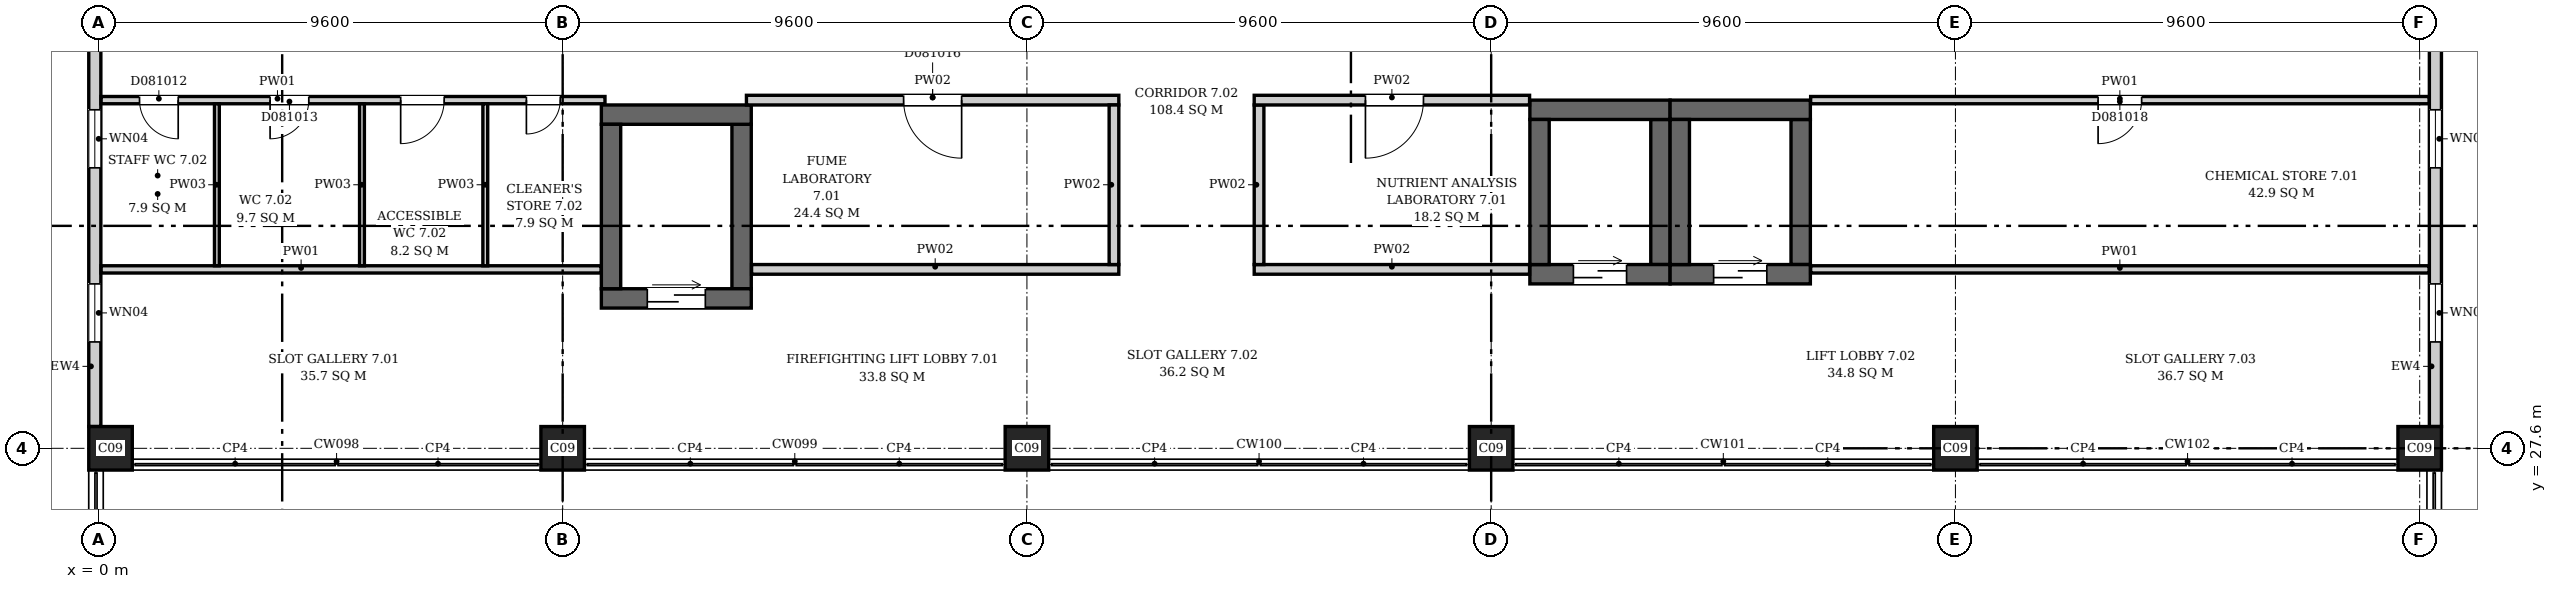
"""IFC4 building model, lengths in metres.
Left out: names, types, materials, properties, quantities, classifications, styles, units other than length and angle.
Written with IfcOpenShell. Run it as: python <this file> out.ifc"""

import sys

from ifc_helpers import new_model, si_unit, direction, frame, frame_2d, origin, origin_2d, place, context, subcontext, project, spatial, rectangle, extrude, element, fill, save


model = new_model("IFC4")
c1 = context("Model", 3, precision=1e-05, world=origin(), true_north=direction((0.0, 1.0)))
c2 = subcontext(c1, "Body", "Model", "MODEL_VIEW")
j1 = project(units=[si_unit("LENGTHUNIT", "METRE"), si_unit("PLANEANGLEUNIT", "RADIAN")], contexts=[c1])
p1 = place(None, origin())
s1 = spatial("IfcSite", under=j1, at=p1, CompositionType="ELEMENT")
p2 = place(p1, origin())
s2 = spatial("IfcBuilding", under=s1, at=p2, CompositionType="ELEMENT")
p3 = place(p2, frame((0.0, 0.0, 40.3)))
s3 = spatial("IfcBuildingStorey", under=s2, at=p3, CompositionType="ELEMENT", Elevation=40.3)
p4 = place(p3, frame((10.4, 30.7, 0.0), z_axis=(0.0, 0.0, 1.0), x_axis=(1.0, 0.0, 0.0)))
e1 = element("IfcWall", 1, at=p4, inside=s3, PredefinedType="SHEAR", context=c2, shape_type="SweptSolid", body=[
    extrude(rectangle(XDim=3.1, YDim=0.4, at=frame_2d((1.55, 0.0))), origin(), (0.0, 0.0, 1.0), 4.2),
])
p5 = place(p4, frame((0.95, 0.0, 0.0)))
e2 = element("IfcOpeningElement", 2, at=p5, cuts=e1, PredefinedType="OPENING", context=c2, shape_type="SweptSolid", body=[
    extrude(rectangle(XDim=1.2, YDim=2.1, at=frame_2d((0.6, 1.05))), frame((0.0, 0.21, 0.0), z_axis=(0.0, -1.0, 0.0), x_axis=(1.0, 0.0, 0.0)), (0.0, 0.0, 1.0), 0.42),
])
p6 = place(p3, frame((10.4, 34.5, 0.0), z_axis=(0.0, 0.0, 1.0), x_axis=(1.0, 0.0, 0.0)))
e3 = element("IfcWall", 3, at=p6, inside=s3, PredefinedType="SHEAR", context=c2, shape_type="SweptSolid", body=[
    extrude(rectangle(XDim=3.1, YDim=0.4, at=frame_2d((1.55, 0.0))), origin(), (0.0, 0.0, 1.0), 4.2),
])
for number, where, z_axis, x_axis in (
    (4, (10.6, 30.9, 0.0), (0.0, 0.0, 1.0), (0.0, 1.0, 0.0)),
    (5, (13.3, 30.9, 0.0), (0.0, 0.0, 1.0), (0.0, 1.0, 0.0)),
):
    element("IfcWall", number, at=place(p3, frame(where, z_axis=z_axis, x_axis=x_axis)), inside=s3, PredefinedType="SHEAR", context=c2, shape_type="SweptSolid", body=[
        extrude(rectangle(XDim=3.4, YDim=0.4, at=frame_2d((1.7, 0.0))), origin(), (0.0, 0.0, 1.0), 4.2),
    ])
p7 = place(p3, frame((29.6, 31.2, 0.0), z_axis=(0.0, 0.0, 1.0), x_axis=(1.0, 0.0, 0.0)))
e6 = element("IfcWall", 6, at=p7, inside=s3, PredefinedType="SHEAR", context=c2, shape_type="SweptSolid", body=[
    extrude(rectangle(XDim=2.9, YDim=0.4, at=frame_2d((1.45, 0.0))), origin(), (0.0, 0.0, 1.0), 4.2),
])
p8 = place(p7, frame((0.9, 0.0, 0.0)))
e7 = element("IfcOpeningElement", 7, at=p8, cuts=e6, PredefinedType="OPENING", context=c2, shape_type="SweptSolid", body=[
    extrude(rectangle(XDim=1.1, YDim=2.1, at=frame_2d((0.55, 1.05))), frame((0.0, 0.21, 0.0), z_axis=(0.0, -1.0, 0.0), x_axis=(1.0, 0.0, 0.0)), (0.0, 0.0, 1.0), 0.42),
])
p9 = place(p3, frame((29.6, 34.6, 0.0), z_axis=(0.0, 0.0, 1.0), x_axis=(1.0, 0.0, 0.0)))
e8 = element("IfcWall", 8, at=p9, inside=s3, PredefinedType="SHEAR", context=c2, shape_type="SweptSolid", body=[
    extrude(rectangle(XDim=2.9, YDim=0.4, at=frame_2d((1.45, 0.0))), origin(), (0.0, 0.0, 1.0), 4.2),
])
for number, where, z_axis, x_axis in (
    (9, (29.8, 31.4, 0.0), (0.0, 0.0, 1.0), (0.0, 1.0, 0.0)),
    (10, (32.3, 31.4, 0.0), (0.0, 0.0, 1.0), (0.0, 1.0, 0.0)),
):
    element("IfcWall", number, at=place(p3, frame(where, z_axis=z_axis, x_axis=x_axis)), inside=s3, PredefinedType="SHEAR", context=c2, shape_type="SweptSolid", body=[
        extrude(rectangle(XDim=3.0, YDim=0.4, at=frame_2d((1.5, 0.0))), origin(), (0.0, 0.0, 1.0), 4.2),
    ])
p10 = place(p3, frame((32.5, 31.2, 0.0), z_axis=(0.0, 0.0, 1.0), x_axis=(1.0, 0.0, 0.0)))
e11 = element("IfcWall", 11, at=p10, inside=s3, PredefinedType="SHEAR", context=c2, shape_type="SweptSolid", body=[
    extrude(rectangle(XDim=2.9, YDim=0.4, at=frame_2d((1.45, 0.0))), origin(), (0.0, 0.0, 1.0), 4.2),
])
p11 = place(p10, frame((0.9, 0.0, 0.0)))
e12 = element("IfcOpeningElement", 12, at=p11, cuts=e11, PredefinedType="OPENING", context=c2, shape_type="SweptSolid", body=[
    extrude(rectangle(XDim=1.1, YDim=2.1, at=frame_2d((0.55, 1.05))), frame((0.0, 0.21, 0.0), z_axis=(0.0, -1.0, 0.0), x_axis=(1.0, 0.0, 0.0)), (0.0, 0.0, 1.0), 0.42),
])
p12 = place(p3, frame((32.5, 34.6, 0.0), z_axis=(0.0, 0.0, 1.0), x_axis=(1.0, 0.0, 0.0)))
e13 = element("IfcWall", 13, at=p12, inside=s3, PredefinedType="SHEAR", context=c2, shape_type="SweptSolid", body=[
    extrude(rectangle(XDim=2.9, YDim=0.4, at=frame_2d((1.45, 0.0))), origin(), (0.0, 0.0, 1.0), 4.2),
])
for number, where, z_axis, x_axis in (
    (14, (32.7, 31.4, 0.0), (0.0, 0.0, 1.0), (0.0, 1.0, 0.0)),
    (15, (35.2, 31.4, 0.0), (0.0, 0.0, 1.0), (0.0, 1.0, 0.0)),
):
    element("IfcWall", number, at=place(p3, frame(where, z_axis=z_axis, x_axis=x_axis)), inside=s3, PredefinedType="SHEAR", context=c2, shape_type="SweptSolid", body=[
        extrude(rectangle(XDim=3.0, YDim=0.4, at=frame_2d((1.5, 0.0))), origin(), (0.0, 0.0, 1.0), 4.2),
    ])
for number, where, z_axis, x_axis in (
    (16, (0.25, 27.6, 0.0), (0.0, 0.0, 1.0), (1.0, 0.0, 0.0)),
    (17, (9.6, 27.6, 0.0), (0.0, 0.0, 1.0), (1.0, 0.0, 0.0)),
    (18, (19.2, 27.6, 0.0), (0.0, 0.0, 1.0), (1.0, 0.0, 0.0)),
    (19, (28.8, 27.6, 0.0), (0.0, 0.0, 1.0), (1.0, 0.0, 0.0)),
    (20, (38.4, 27.6, 0.0), (0.0, 0.0, 1.0), (1.0, 0.0, 0.0)),
    (21, (48.0, 27.6, 0.0), (0.0, 0.0, 1.0), (1.0, 0.0, 0.0)),
):
    element("IfcColumn", number, at=place(p3, frame(where, z_axis=z_axis, x_axis=x_axis)), inside=s3, PredefinedType="COLUMN", context=c2, shape_type="SweptSolid", body=[
        extrude(rectangle(XDim=0.9, YDim=0.9, at=origin_2d()), origin(), (0.0, 0.0, 1.0), 4.2),
    ])
p13 = place(p3, frame((-0.074, 36.35, 0.0), z_axis=(0.0, 0.0, 1.0), x_axis=(0.0, -1.0, 0.0)))
e22 = element("IfcWall", 22, at=p13, inside=s3, PredefinedType="ELEMENTEDWALL", context=c2, shape_type="SweptSolid", body=[
    extrude(rectangle(XDim=8.3, YDim=0.25, at=frame_2d((4.15, 0.0))), origin(), (0.0, 0.0, 1.0), 3.9),
])
p14 = place(p13, frame((5.35, 0.0, 0.9)))
e23 = element("IfcOpeningElement", 23, at=p14, cuts=e22, PredefinedType="OPENING", context=c2, shape_type="SweptSolid", body=[
    extrude(rectangle(XDim=1.2, YDim=2.6, at=frame_2d((0.6, 1.3))), frame((0.0, 0.135, 0.0), z_axis=(0.0, -1.0, 0.0), x_axis=(1.0, 0.0, 0.0)), (0.0, 0.0, 1.0), 0.27),
])
p15 = place(p13, frame((1.75, 0.0, 0.9)))
e24 = element("IfcOpeningElement", 24, at=p15, cuts=e22, PredefinedType="OPENING", context=c2, shape_type="SweptSolid", body=[
    extrude(rectangle(XDim=1.2, YDim=2.6, at=frame_2d((0.6, 1.3))), frame((0.0, 0.135, 0.0), z_axis=(0.0, -1.0, 0.0), x_axis=(1.0, 0.0, 0.0)), (0.0, 0.0, 1.0), 0.27),
])
p16 = place(p3, frame((48.325, 28.05, 0.0), z_axis=(0.0, 0.0, 1.0), x_axis=(0.0, 1.0, 0.0)))
e25 = element("IfcWall", 25, at=p16, inside=s3, PredefinedType="ELEMENTEDWALL", context=c2, shape_type="SweptSolid", body=[
    extrude(rectangle(XDim=8.3, YDim=0.25, at=frame_2d((4.15, 0.0))), origin(), (0.0, 0.0, 1.0), 3.9),
])
p17 = place(p16, frame((1.75, 0.0, 0.9)))
e26 = element("IfcOpeningElement", 26, at=p17, cuts=e25, PredefinedType="OPENING", context=c2, shape_type="SweptSolid", body=[
    extrude(rectangle(XDim=1.2, YDim=2.6, at=frame_2d((0.6, 1.3))), frame((0.0, 0.135, 0.0), z_axis=(0.0, -1.0, 0.0), x_axis=(1.0, 0.0, 0.0)), (0.0, 0.0, 1.0), 0.27),
])
p18 = place(p16, frame((5.35, 0.0, 0.9)))
e27 = element("IfcOpeningElement", 27, at=p18, cuts=e25, PredefinedType="OPENING", context=c2, shape_type="SweptSolid", body=[
    extrude(rectangle(XDim=1.2, YDim=2.6, at=frame_2d((0.6, 1.3))), frame((0.0, 0.135, 0.0), z_axis=(0.0, -1.0, 0.0), x_axis=(1.0, 0.0, 0.0)), (0.0, 0.0, 1.0), 0.27),
])
p19 = place(p3, frame((0.056, 31.3, 0.0), z_axis=(0.0, 0.0, 1.0), x_axis=(1.0, 0.0, 0.0)))
e28 = element("IfcWall", 28, at=p19, inside=s3, PredefinedType="PARTITIONING", context=c2, shape_type="SweptSolid", body=[
    extrude(rectangle(XDim=10.338, YDim=0.15, at=frame_2d((5.169, 0.0))), origin(), (0.0, 0.0, 1.0), 3.9),
])
p20 = place(p3, frame((0.056, 34.8, 0.0), z_axis=(0.0, 0.0, 1.0), x_axis=(1.0, 0.0, 0.0)))
e29 = element("IfcWall", 29, at=p20, inside=s3, PredefinedType="PARTITIONING", context=c2, shape_type="SweptSolid", body=[
    extrude(rectangle(XDim=10.419, YDim=0.15, at=frame_2d((5.209, 0.0))), origin(), (0.0, 0.0, 1.0), 3.9),
])
p21 = place(p20, frame((0.794, 0.0, 0.0)))
e30 = element("IfcOpeningElement", 30, at=p21, cuts=e29, PredefinedType="OPENING", context=c2, shape_type="SweptSolid", body=[
    extrude(rectangle(XDim=0.8, YDim=2.1, at=frame_2d((0.4, 1.05))), frame((0.0, 0.085, 0.0), z_axis=(0.0, -1.0, 0.0), x_axis=(1.0, 0.0, 0.0)), (0.0, 0.0, 1.0), 0.17),
])
p22 = place(p20, frame((3.494, 0.0, 0.0)))
e31 = element("IfcOpeningElement", 31, at=p22, cuts=e29, PredefinedType="OPENING", context=c2, shape_type="SweptSolid", body=[
    extrude(rectangle(XDim=0.8, YDim=2.1, at=frame_2d((0.4, 1.05))), frame((0.0, 0.085, 0.0), z_axis=(0.0, -1.0, 0.0), x_axis=(1.0, 0.0, 0.0)), (0.0, 0.0, 1.0), 0.17),
])
p23 = place(p20, frame((6.194, 0.0, 0.0)))
e32 = element("IfcOpeningElement", 32, at=p23, cuts=e29, PredefinedType="OPENING", context=c2, shape_type="SweptSolid", body=[
    extrude(rectangle(XDim=0.9, YDim=2.1, at=frame_2d((0.45, 1.05))), frame((0.0, 0.085, 0.0), z_axis=(0.0, -1.0, 0.0), x_axis=(1.0, 0.0, 0.0)), (0.0, 0.0, 1.0), 0.17),
])
p24 = place(p20, frame((8.794, 0.0, 0.0)))
e33 = element("IfcOpeningElement", 33, at=p24, cuts=e29, PredefinedType="OPENING", context=c2, shape_type="SweptSolid", body=[
    extrude(rectangle(XDim=0.7, YDim=2.1, at=frame_2d((0.35, 1.05))), frame((0.0, 0.085, 0.0), z_axis=(0.0, -1.0, 0.0), x_axis=(1.0, 0.0, 0.0)), (0.0, 0.0, 1.0), 0.17),
])
for number, where, z_axis, x_axis in (
    (34, (2.45, 31.375, 0.0), (0.0, 0.0, 1.0), (0.0, 1.0, 0.0)),
    (35, (5.45, 31.375, 0.0), (0.0, 0.0, 1.0), (0.0, 1.0, 0.0)),
    (36, (8.0, 31.375, 0.0), (0.0, 0.0, 1.0), (0.0, 1.0, 0.0)),
):
    element("IfcWall", number, at=place(p3, frame(where, z_axis=z_axis, x_axis=x_axis)), inside=s3, PredefinedType="PARTITIONING", context=c2, shape_type="SweptSolid", body=[
        extrude(rectangle(XDim=3.35, YDim=0.1, at=frame_2d((1.675, 0.0))), origin(), (0.0, 0.0, 1.0), 3.9),
    ])
p25 = place(p3, frame((13.4, 34.8, 0.0), z_axis=(0.0, 0.0, 1.0), x_axis=(1.0, 0.0, 0.0)))
e37 = element("IfcWall", 37, at=p25, inside=s3, PredefinedType="PARTITIONING", context=c2, shape_type="SweptSolid", body=[
    extrude(rectangle(XDim=7.7, YDim=0.2, at=frame_2d((3.85, 0.0))), origin(), (0.0, 0.0, 1.0), 3.9),
])
p26 = place(p25, frame((3.25, 0.0, 0.0)))
e38 = element("IfcOpeningElement", 38, at=p26, cuts=e37, PredefinedType="OPENING", context=c2, shape_type="SweptSolid", body=[
    extrude(rectangle(XDim=1.2, YDim=2.1, at=frame_2d((0.6, 1.05))), frame((0.0, 0.11, 0.0), z_axis=(0.0, -1.0, 0.0), x_axis=(1.0, 0.0, 0.0)), (0.0, 0.0, 1.0), 0.22),
])
p27 = place(p3, frame((13.506, 31.3, 0.0), z_axis=(0.0, 0.0, 1.0), x_axis=(1.0, 0.0, 0.0)))
e39 = element("IfcWall", 39, at=p27, inside=s3, PredefinedType="PARTITIONING", context=c2, shape_type="SweptSolid", body=[
    extrude(rectangle(XDim=7.594, YDim=0.2, at=frame_2d((3.797, 0.0))), origin(), (0.0, 0.0, 1.0), 3.9),
])
p28 = place(p3, frame((21.0, 31.4, 0.0), z_axis=(0.0, 0.0, 1.0), x_axis=(0.0, 1.0, 0.0)))
e40 = element("IfcWall", 40, at=p28, inside=s3, PredefinedType="PARTITIONING", context=c2, shape_type="SweptSolid", body=[
    extrude(rectangle(XDim=3.3, YDim=0.2, at=frame_2d((1.65, 0.0))), origin(), (0.0, 0.0, 1.0), 3.9),
])
p29 = place(p3, frame((23.9, 31.3, 0.0), z_axis=(0.0, 0.0, 1.0), x_axis=(1.0, 0.0, 0.0)))
e41 = element("IfcWall", 41, at=p29, inside=s3, PredefinedType="PARTITIONING", context=c2, shape_type="SweptSolid", body=[
    extrude(rectangle(XDim=5.694, YDim=0.2, at=frame_2d((2.847, 0.0))), origin(), (0.0, 0.0, 1.0), 3.9),
])
p30 = place(p3, frame((24.0, 31.4, 0.0), z_axis=(0.0, 0.0, 1.0), x_axis=(0.0, 1.0, 0.0)))
e42 = element("IfcWall", 42, at=p30, inside=s3, PredefinedType="PARTITIONING", context=c2, shape_type="SweptSolid", body=[
    extrude(rectangle(XDim=3.3, YDim=0.2, at=frame_2d((1.65, 0.0))), origin(), (0.0, 0.0, 1.0), 3.9),
])
p31 = place(p3, frame((23.9, 34.8, 0.0), z_axis=(0.0, 0.0, 1.0), x_axis=(1.0, 0.0, 0.0)))
e43 = element("IfcWall", 43, at=p31, inside=s3, PredefinedType="PARTITIONING", context=c2, shape_type="SweptSolid", body=[
    extrude(rectangle(XDim=5.694, YDim=0.2, at=frame_2d((2.847, 0.0))), origin(), (0.0, 0.0, 1.0), 3.9),
])
p32 = place(p31, frame((2.3, 0.0, 0.0)))
e44 = element("IfcOpeningElement", 44, at=p32, cuts=e43, PredefinedType="OPENING", context=c2, shape_type="SweptSolid", body=[
    extrude(rectangle(XDim=1.2, YDim=2.1, at=frame_2d((0.6, 1.05))), frame((0.0, 0.11, 0.0), z_axis=(0.0, -1.0, 0.0), x_axis=(1.0, 0.0, 0.0)), (0.0, 0.0, 1.0), 0.22),
])
p33 = place(p3, frame((35.406, 31.3, 0.0), z_axis=(0.0, 0.0, 1.0), x_axis=(1.0, 0.0, 0.0)))
e45 = element("IfcWall", 45, at=p33, inside=s3, PredefinedType="PARTITIONING", context=c2, shape_type="SweptSolid", body=[
    extrude(rectangle(XDim=12.788, YDim=0.15, at=frame_2d((6.394, 0.0))), origin(), (0.0, 0.0, 1.0), 3.9),
])
p34 = place(p3, frame((35.406, 34.8, 0.0), z_axis=(0.0, 0.0, 1.0), x_axis=(1.0, 0.0, 0.0)))
e46 = element("IfcWall", 46, at=p34, inside=s3, PredefinedType="PARTITIONING", context=c2, shape_type="SweptSolid", body=[
    extrude(rectangle(XDim=12.788, YDim=0.15, at=frame_2d((6.394, 0.0))), origin(), (0.0, 0.0, 1.0), 3.9),
])
p35 = place(p34, frame((5.944, 0.0, 0.0)))
e47 = element("IfcOpeningElement", 47, at=p35, cuts=e46, PredefinedType="OPENING", context=c2, shape_type="SweptSolid", body=[
    extrude(rectangle(XDim=0.9, YDim=2.1, at=frame_2d((0.45, 1.05))), frame((0.0, 0.085, 0.0), z_axis=(0.0, -1.0, 0.0), x_axis=(1.0, 0.0, 0.0)), (0.0, 0.0, 1.0), 0.17),
])
p36 = place(p14, origin())
e48 = element("IfcWindow", 48, at=p36, inside=s3, PartitioningType="SINGLE_PANEL", PredefinedType="WINDOW", context=c2, shape_type="SweptSolid", body=[
    extrude(rectangle(XDim=1.2, YDim=2.6, at=frame_2d((0.6, 1.3))), frame((0.0, 0.03, 0.0), z_axis=(0.0, -1.0, 0.0), x_axis=(1.0, 0.0, 0.0)), (0.0, 0.0, 1.0), 0.06),
])
fill(e23, e48)
p37 = place(p15, origin())
e49 = element("IfcWindow", 49, at=p37, inside=s3, PartitioningType="SINGLE_PANEL", PredefinedType="WINDOW", context=c2, shape_type="SweptSolid", body=[
    extrude(rectangle(XDim=1.2, YDim=2.6, at=frame_2d((0.6, 1.3))), frame((0.0, 0.03, 0.0), z_axis=(0.0, -1.0, 0.0), x_axis=(1.0, 0.0, 0.0)), (0.0, 0.0, 1.0), 0.06),
])
fill(e24, e49)
p38 = place(p17, origin())
e50 = element("IfcWindow", 50, at=p38, inside=s3, PartitioningType="SINGLE_PANEL", PredefinedType="WINDOW", context=c2, shape_type="SweptSolid", body=[
    extrude(rectangle(XDim=1.2, YDim=2.6, at=frame_2d((0.6, 1.3))), frame((0.0, 0.03, 0.0), z_axis=(0.0, -1.0, 0.0), x_axis=(1.0, 0.0, 0.0)), (0.0, 0.0, 1.0), 0.06),
])
fill(e26, e50)
p39 = place(p18, origin())
e51 = element("IfcWindow", 51, at=p39, inside=s3, PartitioningType="SINGLE_PANEL", PredefinedType="WINDOW", context=c2, shape_type="SweptSolid", body=[
    extrude(rectangle(XDim=1.2, YDim=2.6, at=frame_2d((0.6, 1.3))), frame((0.0, 0.03, 0.0), z_axis=(0.0, -1.0, 0.0), x_axis=(1.0, 0.0, 0.0)), (0.0, 0.0, 1.0), 0.06),
])
fill(e27, e51)
p40 = place(p5, origin())
e52 = element("IfcDoor", 52, at=p40, inside=s3, OperationType="DOUBLE_DOOR_SLIDING", PredefinedType="DOOR", context=c2, shape_type="SweptSolid", body=[
    extrude(rectangle(XDim=1.2, YDim=2.1, at=frame_2d((0.6, 1.05))), frame((0.0, 0.025, 0.0), z_axis=(0.0, -1.0, 0.0), x_axis=(1.0, 0.0, 0.0)), (0.0, 0.0, 1.0), 0.05),
])
fill(e2, e52)
p41 = place(p8, origin())
e53 = element("IfcDoor", 53, at=p41, inside=s3, OperationType="DOUBLE_DOOR_SLIDING", PredefinedType="DOOR", context=c2, shape_type="SweptSolid", body=[
    extrude(rectangle(XDim=1.1, YDim=2.1, at=frame_2d((0.55, 1.05))), frame((0.0, 0.025, 0.0), z_axis=(0.0, -1.0, 0.0), x_axis=(1.0, 0.0, 0.0)), (0.0, 0.0, 1.0), 0.05),
])
fill(e7, e53)
p42 = place(p11, origin())
e54 = element("IfcDoor", 54, at=p42, inside=s3, OperationType="DOUBLE_DOOR_SLIDING", PredefinedType="DOOR", context=c2, shape_type="SweptSolid", body=[
    extrude(rectangle(XDim=1.1, YDim=2.1, at=frame_2d((0.55, 1.05))), frame((0.0, 0.025, 0.0), z_axis=(0.0, -1.0, 0.0), x_axis=(1.0, 0.0, 0.0)), (0.0, 0.0, 1.0), 0.05),
])
fill(e12, e54)
p43 = place(p21, origin())
e55 = element("IfcDoor", 55, at=p43, inside=s3, OperationType="SINGLE_SWING_RIGHT", PredefinedType="DOOR", context=c2, shape_type="SweptSolid", body=[
    extrude(rectangle(XDim=0.8, YDim=2.1, at=frame_2d((0.4, 1.05))), frame((0.0, 0.025, 0.0), z_axis=(0.0, -1.0, 0.0), x_axis=(1.0, 0.0, 0.0)), (0.0, 0.0, 1.0), 0.05),
])
fill(e30, e55)
p44 = place(p22, origin())
e56 = element("IfcDoor", 56, at=p44, inside=s3, OperationType="SINGLE_SWING_LEFT", PredefinedType="DOOR", context=c2, shape_type="SweptSolid", body=[
    extrude(rectangle(XDim=0.8, YDim=2.1, at=frame_2d((0.4, 1.05))), frame((0.0, 0.025, 0.0), z_axis=(0.0, -1.0, 0.0), x_axis=(1.0, 0.0, 0.0)), (0.0, 0.0, 1.0), 0.05),
])
fill(e31, e56)
p45 = place(p23, origin())
e57 = element("IfcDoor", 57, at=p45, inside=s3, OperationType="SINGLE_SWING_LEFT", PredefinedType="DOOR", context=c2, shape_type="SweptSolid", body=[
    extrude(rectangle(XDim=0.9, YDim=2.1, at=frame_2d((0.45, 1.05))), frame((0.0, 0.025, 0.0), z_axis=(0.0, -1.0, 0.0), x_axis=(1.0, 0.0, 0.0)), (0.0, 0.0, 1.0), 0.05),
])
fill(e32, e57)
p46 = place(p24, origin())
e58 = element("IfcDoor", 58, at=p46, inside=s3, OperationType="SINGLE_SWING_LEFT", PredefinedType="DOOR", context=c2, shape_type="SweptSolid", body=[
    extrude(rectangle(XDim=0.7, YDim=2.1, at=frame_2d((0.35, 1.05))), frame((0.0, 0.025, 0.0), z_axis=(0.0, -1.0, 0.0), x_axis=(1.0, 0.0, 0.0)), (0.0, 0.0, 1.0), 0.05),
])
fill(e33, e58)
p47 = place(p26, origin())
e59 = element("IfcDoor", 59, at=p47, inside=s3, OperationType="SINGLE_SWING_RIGHT", PredefinedType="DOOR", context=c2, shape_type="SweptSolid", body=[
    extrude(rectangle(XDim=1.2, YDim=2.1, at=frame_2d((0.6, 1.05))), frame((0.0, 0.025, 0.0), z_axis=(0.0, -1.0, 0.0), x_axis=(1.0, 0.0, 0.0)), (0.0, 0.0, 1.0), 0.05),
])
fill(e38, e59)
p48 = place(p32, origin())
e60 = element("IfcDoor", 60, at=p48, inside=s3, OperationType="SINGLE_SWING_LEFT", PredefinedType="DOOR", context=c2, shape_type="SweptSolid", body=[
    extrude(rectangle(XDim=1.2, YDim=2.1, at=frame_2d((0.6, 1.05))), frame((0.0, 0.025, 0.0), z_axis=(0.0, -1.0, 0.0), x_axis=(1.0, 0.0, 0.0)), (0.0, 0.0, 1.0), 0.05),
])
fill(e44, e60)
p49 = place(p35, origin())
e61 = element("IfcDoor", 61, at=p49, inside=s3, OperationType="SINGLE_SWING_LEFT", PredefinedType="DOOR", context=c2, shape_type="SweptSolid", body=[
    extrude(rectangle(XDim=0.9, YDim=2.1, at=frame_2d((0.45, 1.05))), frame((0.0, 0.025, 0.0), z_axis=(0.0, -1.0, 0.0), x_axis=(1.0, 0.0, 0.0)), (0.0, 0.0, 1.0), 0.05),
])
fill(e47, e61)
save(model, sys.argv[1])
